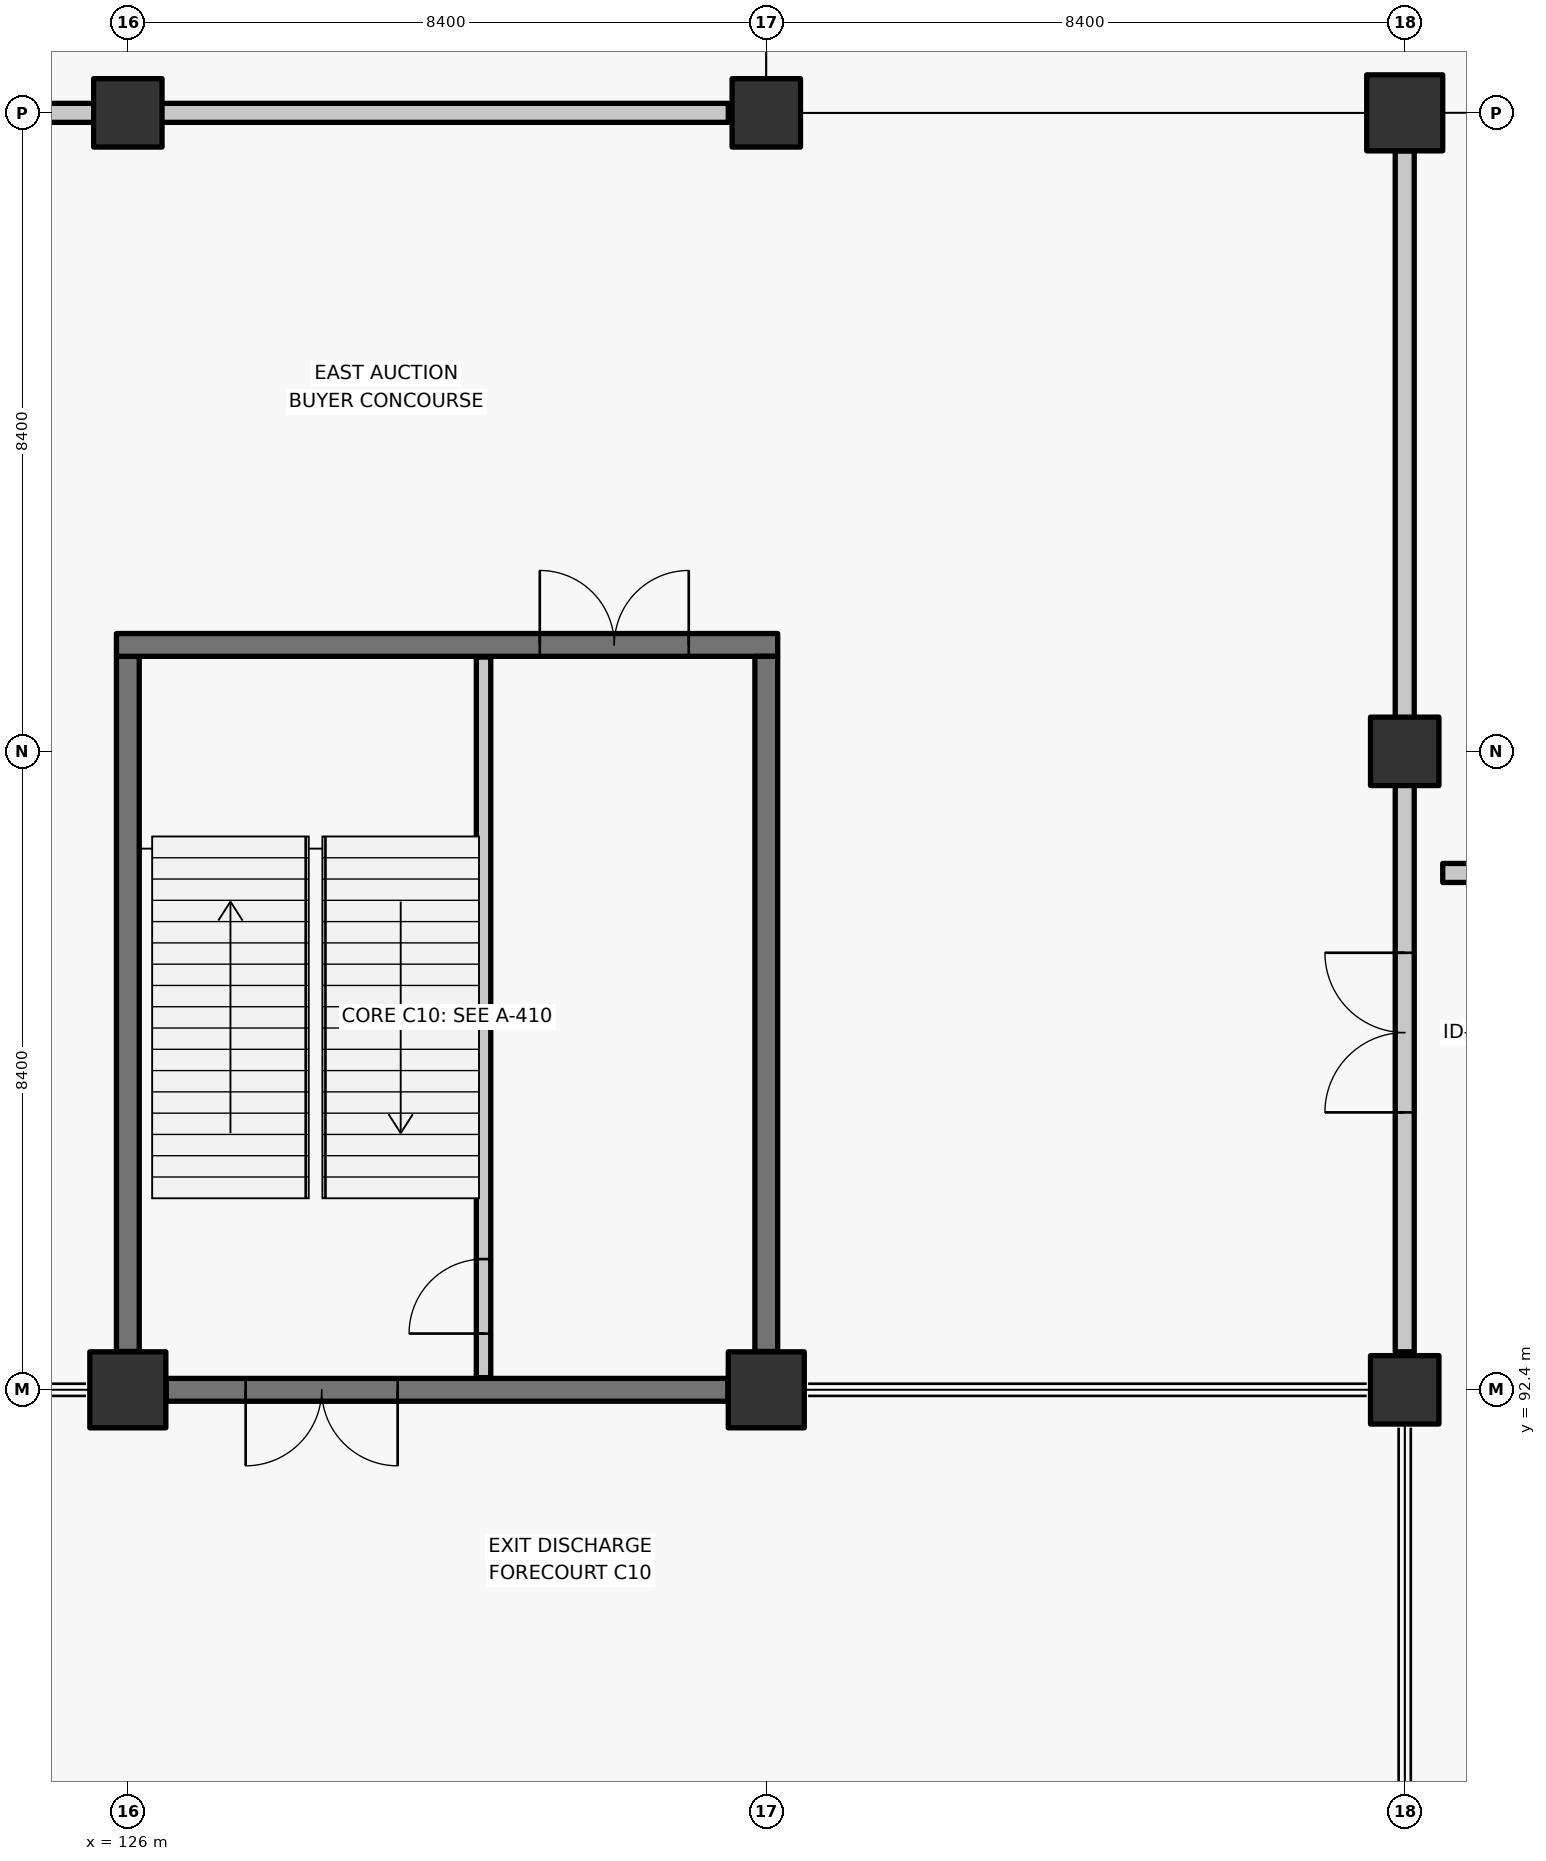
"""IFC4 building model, lengths in metres.
Left out: names, types, materials, properties, quantities, classifications, styles, units other than length and angle.
Written with IfcOpenShell. Run it as: python <this file> out.ifc"""

import sys

from ifc_helpers import new_model, si_unit, direction, frame, frame_2d, origin, origin_2d, place, context, subcontext, project, spatial, rectangle, extrude, element, fill, save


model = new_model("IFC4")
c1 = context("Model", 3, precision=1e-05, world=origin(), true_north=direction((0.0, 1.0)))
c2 = subcontext(c1, "Body", "Model", "MODEL_VIEW")
j1 = project(units=[si_unit("LENGTHUNIT", "METRE"), si_unit("PLANEANGLEUNIT", "RADIAN")], contexts=[c1])
p1 = place(None, origin())
s1 = spatial("IfcSite", under=j1, at=p1, CompositionType="ELEMENT")
p2 = place(p1, origin())
s2 = spatial("IfcBuilding", under=s1, at=p2, CompositionType="ELEMENT")
p3 = place(p2, origin())
s3 = spatial("IfcBuildingStorey", under=s2, at=p3, CompositionType="ELEMENT", Elevation=0.0)
p4 = place(p3, frame((126.0, 92.4, -0.36), z_axis=(0.0, 0.0, 1.0), x_axis=(1.0, 0.0, 0.0)))
e1 = element("IfcColumn", 1, at=p4, inside=s3, PredefinedType="COLUMN", context=c2, shape_type="SweptSolid", body=[
    extrude(rectangle(XDim=1.0, YDim=1.0, at=origin_2d()), origin(), (0.0, 0.0, 1.0), 6.36),
])
p5 = place(p3, frame((126.0, 109.2, -0.36), z_axis=(0.0, 0.0, 1.0), x_axis=(1.0, 0.0, 0.0)))
e2 = element("IfcColumn", 2, at=p5, inside=s3, PredefinedType="COLUMN", context=c2, shape_type="SweptSolid", body=[
    extrude(rectangle(XDim=0.9, YDim=0.9, at=origin_2d()), origin(), (0.0, 0.0, 1.0), 6.36),
])
p6 = place(p3, frame((134.4, 92.4, -0.36), z_axis=(0.0, 0.0, 1.0), x_axis=(1.0, 0.0, 0.0)))
e3 = element("IfcColumn", 3, at=p6, inside=s3, PredefinedType="COLUMN", context=c2, shape_type="SweptSolid", body=[
    extrude(rectangle(XDim=1.0, YDim=1.0, at=origin_2d()), origin(), (0.0, 0.0, 1.0), 6.36),
])
for number, where, z_axis, x_axis in (
    (4, (134.4, 109.2, -0.36), (0.0, 0.0, 1.0), (1.0, 0.0, 0.0)),
    (5, (142.8, 92.4, -0.36), (0.0, 0.0, 1.0), (1.0, 0.0, 0.0)),
    (6, (142.8, 100.8, -0.36), (0.0, 0.0, 1.0), (1.0, 0.0, 0.0)),
):
    element("IfcColumn", number, at=place(p3, frame(where, z_axis=z_axis, x_axis=x_axis)), inside=s3, PredefinedType="COLUMN", context=c2, shape_type="SweptSolid", body=[
        extrude(rectangle(XDim=0.9, YDim=0.9, at=origin_2d()), origin(), (0.0, 0.0, 1.0), 6.36),
    ])
p7 = place(p3, frame((142.8, 109.2, -0.36), z_axis=(0.0, 0.0, 1.0), x_axis=(1.0, 0.0, 0.0)))
e7 = element("IfcColumn", 7, at=p7, inside=s3, PredefinedType="COLUMN", context=c2, shape_type="SweptSolid", body=[
    extrude(rectangle(XDim=1.0, YDim=1.0, at=origin_2d()), origin(), (0.0, 0.0, 1.0), 6.36),
])
p8 = place(p3, frame((133.895, 92.4, -0.36), z_axis=(0.0, 0.0, 1.0), x_axis=(-1.0, 0.0, 0.0)))
e8 = element("IfcWall", 8, at=p8, inside=s3, PredefinedType="SHEAR", context=c2, shape_type="SweptSolid", body=[
    extrude(rectangle(XDim=7.39, YDim=0.3, at=frame_2d((3.695, 0.0))), origin(), (0.0, 0.0, 1.0), 6.08),
])
p9 = place(p8, frame((4.345, 0.0, 0.36)))
e9 = element("IfcOpeningElement", 9, at=p9, cuts=e8, PredefinedType="OPENING", context=c2, shape_type="SweptSolid", body=[
    extrude(rectangle(XDim=2.0, YDim=2.28, at=frame_2d((1.0, 1.14))), frame((0.0, 0.16, 0.0), z_axis=(0.0, -1.0, 0.0), x_axis=(1.0, 0.0, 0.0)), (0.0, 0.0, 1.0), 0.32),
])
p10 = place(p3, frame((126.0, 92.905, -0.36), z_axis=(0.0, 0.0, 1.0), x_axis=(0.0, 1.0, 0.0)))
e10 = element("IfcWall", 10, at=p10, inside=s3, PredefinedType="SHEAR", context=c2, shape_type="SweptSolid", body=[
    extrude(rectangle(XDim=9.145, YDim=0.3, at=frame_2d((4.573, 0.0))), origin(), (0.0, 0.0, 1.0), 6.08),
])
p11 = place(p3, frame((125.85, 102.2, -0.36), z_axis=(0.0, 0.0, 1.0), x_axis=(1.0, 0.0, 0.0)))
e11 = element("IfcWall", 11, at=p11, inside=s3, PredefinedType="SHEAR", context=c2, shape_type="SweptSolid", body=[
    extrude(rectangle(XDim=8.7, YDim=0.3, at=frame_2d((4.35, 0.0))), origin(), (0.0, 0.0, 1.0), 6.08),
])
p12 = place(p11, frame((5.57, 0.0, 0.36)))
e12 = element("IfcOpeningElement", 12, at=p12, cuts=e11, PredefinedType="OPENING", context=c2, shape_type="SweptSolid", body=[
    extrude(rectangle(XDim=1.96, YDim=2.2, at=frame_2d((0.98, 1.1))), frame((0.0, 0.16, 0.0), z_axis=(0.0, -1.0, 0.0), x_axis=(1.0, 0.0, 0.0)), (0.0, 0.0, 1.0), 0.32),
])
p13 = place(p3, frame((134.4, 102.05, -0.36), z_axis=(0.0, 0.0, 1.0), x_axis=(0.0, -1.0, 0.0)))
e13 = element("IfcWall", 13, at=p13, inside=s3, PredefinedType="SHEAR", context=c2, shape_type="SweptSolid", body=[
    extrude(rectangle(XDim=9.145, YDim=0.3, at=frame_2d((4.573, 0.0))), origin(), (0.0, 0.0, 1.0), 6.08),
])
p14 = place(p3, frame((130.68, 92.56, -0.36), z_axis=(0.0, 0.0, 1.0), x_axis=(0.0, 1.0, 0.0)))
e14 = element("IfcWall", 14, at=p14, inside=s3, PredefinedType="SOLIDWALL", context=c2, shape_type="SweptSolid", body=[
    extrude(rectangle(XDim=9.48, YDim=0.19, at=frame_2d((4.74, 0.0))), origin(), (0.0, 0.0, 1.0), 6.08),
])
p15 = place(p14, frame((0.58, 0.0, 0.36)))
e15 = element("IfcOpeningElement", 15, at=p15, cuts=e14, PredefinedType="OPENING", context=c2, shape_type="SweptSolid", body=[
    extrude(rectangle(XDim=0.98, YDim=2.15, at=frame_2d((0.49, 1.075))), frame((0.0, 0.105, 0.0), z_axis=(0.0, -1.0, 0.0), x_axis=(1.0, 0.0, 0.0)), (0.0, 0.0, 1.0), 0.21),
])
p16 = place(p3, frame((143.3, 99.2, 0.0), z_axis=(0.0, 0.0, 1.0), x_axis=(1.0, 0.0, 0.0)))
e16 = element("IfcWall", 16, at=p16, inside=s3, PredefinedType="SOLIDWALL", context=c2, shape_type="SweptSolid", body=[
    extrude(rectangle(XDim=66.2, YDim=0.25, at=frame_2d((33.1, 0.0))), origin(), (0.0, 0.0, 1.0), 5.73),
])
p17 = place(p16, frame((11.05, 0.0, 0.0)))
e17 = element("IfcOpeningElement", 17, at=p17, cuts=e16, PredefinedType="OPENING", context=c2, shape_type="SweptSolid", body=[
    extrude(rectangle(XDim=2.1, YDim=2.3, at=frame_2d((1.05, 1.15))), frame((0.0, 0.135, 0.0), z_axis=(0.0, -1.0, 0.0), x_axis=(1.0, 0.0, 0.0)), (0.0, 0.0, 1.0), 0.27),
])
p18 = place(p16, frame((44.65, 0.0, 0.0)))
e18 = element("IfcOpeningElement", 18, at=p18, cuts=e16, PredefinedType="OPENING", context=c2, shape_type="SweptSolid", body=[
    extrude(rectangle(XDim=2.1, YDim=2.3, at=frame_2d((1.05, 1.15))), frame((0.0, 0.135, 0.0), z_axis=(0.0, -1.0, 0.0), x_axis=(1.0, 0.0, 0.0)), (0.0, 0.0, 1.0), 0.27),
])
p19 = place(p3, frame((84.5, 109.2, 0.0), z_axis=(0.0, 0.0, 1.0), x_axis=(1.0, 0.0, 0.0)))
e19 = element("IfcWall", 19, at=p19, inside=s3, PredefinedType="SOLIDWALL", context=c2, shape_type="SweptSolid", body=[
    extrude(rectangle(XDim=49.4, YDim=0.25, at=frame_2d((24.7, 0.0))), origin(), (0.0, 0.0, 1.0), 5.13),
])
p20 = place(p19, frame((11.05, 0.0, 0.0)))
e20 = element("IfcOpeningElement", 20, at=p20, cuts=e19, PredefinedType="OPENING", context=c2, shape_type="SweptSolid", body=[
    extrude(rectangle(XDim=2.1, YDim=2.3, at=frame_2d((1.05, 1.15))), frame((0.0, 0.135, 0.0), z_axis=(0.0, -1.0, 0.0), x_axis=(1.0, 0.0, 0.0)), (0.0, 0.0, 1.0), 0.27),
])
p21 = place(p19, frame((36.25, 0.0, 0.0)))
e21 = element("IfcOpeningElement", 21, at=p21, cuts=e19, PredefinedType="OPENING", context=c2, shape_type="SweptSolid", body=[
    extrude(rectangle(XDim=2.1, YDim=2.3, at=frame_2d((1.05, 1.15))), frame((0.0, 0.135, 0.0), z_axis=(0.0, -1.0, 0.0), x_axis=(1.0, 0.0, 0.0)), (0.0, 0.0, 1.0), 0.27),
])
p22 = place(p3, frame((142.8, 92.9, 0.0), z_axis=(0.0, 0.0, 1.0), x_axis=(0.0, 1.0, 0.0)))
e22 = element("IfcWall", 22, at=p22, inside=s3, PredefinedType="SOLIDWALL", context=c2, shape_type="SweptSolid", body=[
    extrude(rectangle(XDim=15.8, YDim=0.25, at=frame_2d((7.9, 0.0))), origin(), (0.0, 0.0, 1.0), 5.07),
])
p23 = place(p22, frame((3.15, 0.0, 0.0)))
e23 = element("IfcOpeningElement", 23, at=p23, cuts=e22, PredefinedType="OPENING", context=c2, shape_type="SweptSolid", body=[
    extrude(rectangle(XDim=2.1, YDim=2.3, at=frame_2d((1.05, 1.15))), frame((0.0, 0.135, 0.0), z_axis=(0.0, -1.0, 0.0), x_axis=(1.0, 0.0, 0.0)), (0.0, 0.0, 1.0), 0.27),
])
p24 = place(p15, origin())
e24 = element("IfcDoor", 24, at=p24, inside=s3, OperationType="SINGLE_SWING_LEFT", PredefinedType="DOOR", context=c2, shape_type="SweptSolid", body=[
    extrude(rectangle(XDim=0.98, YDim=2.15, at=frame_2d((0.49, 1.075))), frame((0.0, 0.025, 0.0), z_axis=(0.0, -1.0, 0.0), x_axis=(1.0, 0.0, 0.0)), (0.0, 0.0, 1.0), 0.05),
])
fill(e15, e24)
p25 = place(p12, origin())
e25 = element("IfcDoor", 25, at=p25, inside=s3, OperationType="DOUBLE_DOOR_SINGLE_SWING", PredefinedType="DOOR", context=c2, shape_type="SweptSolid", body=[
    extrude(rectangle(XDim=1.96, YDim=2.2, at=frame_2d((0.98, 1.1))), frame((0.0, 0.025, 0.0), z_axis=(0.0, -1.0, 0.0), x_axis=(1.0, 0.0, 0.0)), (0.0, 0.0, 1.0), 0.05),
])
fill(e12, e25)
p26 = place(p9, origin())
e26 = element("IfcDoor", 26, at=p26, inside=s3, OperationType="DOUBLE_DOOR_SINGLE_SWING", PredefinedType="DOOR", context=c2, shape_type="SweptSolid", body=[
    extrude(rectangle(XDim=2.0, YDim=2.28, at=frame_2d((1.0, 1.14))), frame((0.0, 0.025, 0.0), z_axis=(0.0, -1.0, 0.0), x_axis=(1.0, 0.0, 0.0)), (0.0, 0.0, 1.0), 0.05),
])
fill(e9, e26)
p27 = place(p23, origin())
e27 = element("IfcDoor", 27, at=p27, inside=s3, OperationType="DOUBLE_DOOR_SINGLE_SWING", PredefinedType="DOOR", context=c2, shape_type="SweptSolid", body=[
    extrude(rectangle(XDim=2.1, YDim=2.3, at=frame_2d((1.05, 1.15))), frame((0.0, 0.025, 0.0), z_axis=(0.0, -1.0, 0.0), x_axis=(1.0, 0.0, 0.0)), (0.0, 0.0, 1.0), 0.05),
])
fill(e23, e27)
save(model, sys.argv[1])
